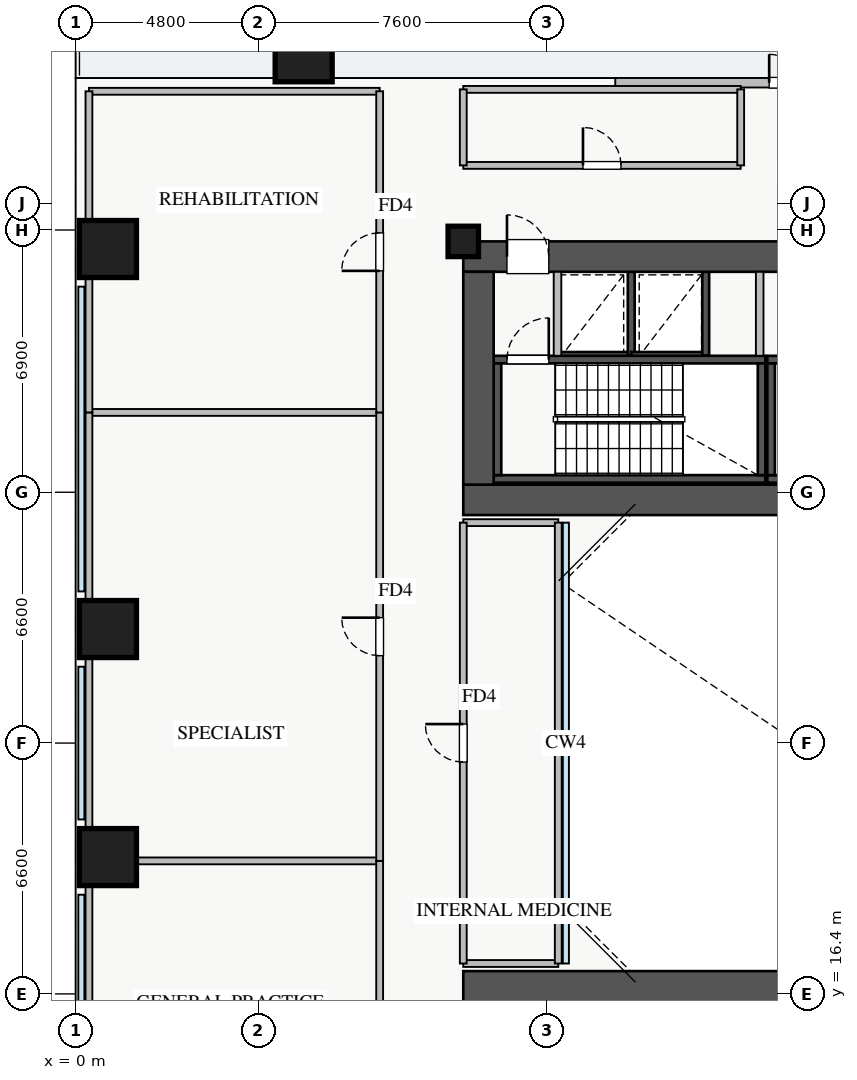
"""IFC4 building model, lengths in metres.
Left out: names, types, materials, properties, quantities, classifications, styles, units other than length and angle.
Written with IfcOpenShell. Run it as: python <this file> out.ifc"""

import sys

from ifc_helpers import new_model, si_unit, direction, frame, frame_2d, origin, origin_2d, place, context, subcontext, project, spatial, rectangle, extrude, source, transform, mapped, element, fill, save


model = new_model("IFC4")
c1 = context("Model", 3, precision=1e-05, world=origin(), true_north=direction((0.0, 1.0)))
c2 = subcontext(c1, "Body", "Model", "MODEL_VIEW")
j1 = project(units=[si_unit("LENGTHUNIT", "METRE"), si_unit("PLANEANGLEUNIT", "RADIAN")], contexts=[c1])
p1 = place(None, origin())
s1 = spatial("IfcSite", under=j1, at=p1, CompositionType="ELEMENT")
p2 = place(p1, origin())
s2 = spatial("IfcBuilding", under=s1, at=p2, CompositionType="ELEMENT")
p3 = place(p2, frame((0.0, 0.0, 13.8)))
s3 = spatial("IfcBuildingStorey", under=s2, at=p3, CompositionType="ELEMENT", Elevation=13.8)
p4 = place(p3, frame((12.68, 33.2, 0.0), z_axis=(0.0, 0.0, 1.0), x_axis=(1.0, 0.0, 0.0)))
e1 = element("IfcWall", 1, at=p4, inside=s3, PredefinedType="SHEAR", context=c2, shape_type="SweptSolid", body=[
    extrude(rectangle(XDim=1.94, YDim=0.18, at=frame_2d((0.97, 0.0))), origin(), (0.0, 0.0, 1.0), 4.15),
])
p5 = place(p3, frame((14.62, 33.2, 0.0), z_axis=(0.0, 0.0, 1.0), x_axis=(0.0, 1.0, 0.0)))
e2 = element("IfcWall", 2, at=p5, inside=s3, PredefinedType="SHEAR", context=c2, shape_type="SweptSolid", body=[
    extrude(rectangle(XDim=2.2, YDim=0.18, at=frame_2d((1.1, 0.0))), origin(), (0.0, 0.0, 1.0), 4.15),
])
p6 = place(p3, frame((14.62, 33.2, 0.0), z_axis=(0.0, 0.0, 1.0), x_axis=(1.0, 0.0, 0.0)))
e3 = element("IfcWall", 3, at=p6, inside=s3, PredefinedType="SHEAR", context=c2, shape_type="SweptSolid", body=[
    extrude(rectangle(XDim=1.96, YDim=0.18, at=frame_2d((0.98, 0.0))), origin(), (0.0, 0.0, 1.0), 4.15),
])
p7 = place(p3, frame((16.58, 33.2, 0.0), z_axis=(0.0, 0.0, 1.0), x_axis=(0.0, 1.0, 0.0)))
e4 = element("IfcWall", 4, at=p7, inside=s3, PredefinedType="SHEAR", context=c2, shape_type="SweptSolid", body=[
    extrude(rectangle(XDim=2.2, YDim=0.18, at=frame_2d((1.1, 0.0))), origin(), (0.0, 0.0, 1.0), 4.15),
])
p8 = place(p3, frame((11.0, 29.95, 0.0), z_axis=(0.0, 0.0, 1.0), x_axis=(1.0, 0.0, 0.0)))
e5 = element("IfcWall", 5, at=p8, inside=s3, PredefinedType="SHEAR", context=c2, shape_type="SweptSolid", body=[
    extrude(rectangle(XDim=7.15, YDim=0.2, at=frame_2d((3.575, 0.0))), origin(), (0.0, 0.0, 1.0), 4.4),
])
p9 = place(p3, frame((11.0, 33.09, 0.0), z_axis=(0.0, 0.0, 1.0), x_axis=(1.0, 0.0, 0.0)))
e6 = element("IfcWall", 6, at=p9, inside=s3, PredefinedType="SHEAR", context=c2, shape_type="SweptSolid", body=[
    extrude(rectangle(XDim=7.15, YDim=0.2, at=frame_2d((3.575, 0.0))), origin(), (0.0, 0.0, 1.0), 4.4),
])
p10 = place(p9, frame((0.35, 0.0, 0.0)))
e7 = element("IfcOpeningElement", 7, at=p10, cuts=e6, PredefinedType="OPENING", context=c2, shape_type="SweptSolid", body=[
    extrude(rectangle(XDim=1.1, YDim=2.05, at=frame_2d((0.55, 1.025))), frame((0.0, 0.11, 0.0), z_axis=(0.0, -1.0, 0.0), x_axis=(1.0, 0.0, 0.0)), (0.0, 0.0, 1.0), 0.22),
])
for number, where, z_axis, x_axis in (
    (8, (11.1, 30.05, 0.0), (0.0, 0.0, 1.0), (0.0, 1.0, 0.0)),
    (9, (18.05, 30.05, 0.0), (0.0, 0.0, 1.0), (0.0, 1.0, 0.0)),
):
    element("IfcWall", number, at=place(p3, frame(where, z_axis=z_axis, x_axis=x_axis)), inside=s3, PredefinedType="SHEAR", context=c2, shape_type="SweptSolid", body=[
        extrude(rectangle(XDim=2.94, YDim=0.2, at=frame_2d((1.47, 0.0))), origin(), (0.0, 0.0, 1.0), 4.4),
    ])
p11 = place(p3, frame((18.2, 29.95, 0.0), z_axis=(0.0, 0.0, 1.0), x_axis=(1.0, 0.0, 0.0)))
e10 = element("IfcWall", 10, at=p11, inside=s3, PredefinedType="SHEAR", context=c2, shape_type="SweptSolid", body=[
    extrude(rectangle(XDim=7.15, YDim=0.2, at=frame_2d((3.575, 0.0))), origin(), (0.0, 0.0, 1.0), 4.4),
])
p12 = place(p3, frame((18.2, 33.09, 0.0), z_axis=(0.0, 0.0, 1.0), x_axis=(1.0, 0.0, 0.0)))
e11 = element("IfcWall", 11, at=p12, inside=s3, PredefinedType="SHEAR", context=c2, shape_type="SweptSolid", body=[
    extrude(rectangle(XDim=7.15, YDim=0.2, at=frame_2d((3.575, 0.0))), origin(), (0.0, 0.0, 1.0), 4.4),
])
p13 = place(p12, frame((0.35, 0.0, 0.0)))
e12 = element("IfcOpeningElement", 12, at=p13, cuts=e11, PredefinedType="OPENING", context=c2, shape_type="SweptSolid", body=[
    extrude(rectangle(XDim=1.1, YDim=2.05, at=frame_2d((0.55, 1.025))), frame((0.0, 0.11, 0.0), z_axis=(0.0, -1.0, 0.0), x_axis=(1.0, 0.0, 0.0)), (0.0, 0.0, 1.0), 0.22),
])
p14 = place(p3, frame((18.3, 30.05, 0.0), z_axis=(0.0, 0.0, 1.0), x_axis=(0.0, 1.0, 0.0)))
e13 = element("IfcWall", 13, at=p14, inside=s3, PredefinedType="SHEAR", context=c2, shape_type="SweptSolid", body=[
    extrude(rectangle(XDim=2.94, YDim=0.2, at=frame_2d((1.47, 0.0))), origin(), (0.0, 0.0, 1.0), 4.4),
])
p15 = place(p3, frame((10.2, 29.4, 0.0), z_axis=(0.0, 0.0, 1.0), x_axis=(1.0, 0.0, 0.0)))
e14 = element("IfcWall", 14, at=p15, inside=s3, PredefinedType="SHEAR", context=c2, shape_type="SweptSolid", body=[
    extrude(rectangle(XDim=17.6, YDim=0.8, at=frame_2d((8.8, 0.0))), origin(), (0.0, 0.0, 1.0), 4.4),
])
p16 = place(p3, frame((10.2, 35.8, 0.0), z_axis=(0.0, 0.0, 1.0), x_axis=(1.0, 0.0, 0.0)))
e15 = element("IfcWall", 15, at=p16, inside=s3, PredefinedType="SHEAR", context=c2, shape_type="SweptSolid", body=[
    extrude(rectangle(XDim=17.6, YDim=0.8, at=frame_2d((8.8, 0.0))), origin(), (0.0, 0.0, 1.0), 4.4),
])
p17 = place(p16, frame((1.15, 0.0, 0.0)))
e16 = element("IfcOpeningElement", 16, at=p17, cuts=e15, PredefinedType="OPENING", context=c2, shape_type="SweptSolid", body=[
    extrude(rectangle(XDim=1.1, YDim=2.05, at=frame_2d((0.55, 1.025))), frame((0.0, 0.41, 0.0), z_axis=(0.0, -1.0, 0.0), x_axis=(1.0, 0.0, 0.0)), (0.0, 0.0, 1.0), 0.82),
])
p18 = place(p16, frame((8.3, 0.0, 0.0)))
e17 = element("IfcOpeningElement", 17, at=p18, cuts=e15, PredefinedType="OPENING", context=c2, shape_type="SweptSolid", body=[
    extrude(rectangle(XDim=1.1, YDim=2.05, at=frame_2d((0.55, 1.025))), frame((0.0, 0.41, 0.0), z_axis=(0.0, -1.0, 0.0), x_axis=(1.0, 0.0, 0.0)), (0.0, 0.0, 1.0), 0.82),
])
p19 = place(p16, frame((10.05, 0.0, 0.0)))
e18 = element("IfcOpeningElement", 18, at=p19, cuts=e15, PredefinedType="OPENING", context=c2, shape_type="SweptSolid", body=[
    extrude(rectangle(XDim=1.1, YDim=2.05, at=frame_2d((0.55, 1.025))), frame((0.0, 0.41, 0.0), z_axis=(0.0, -1.0, 0.0), x_axis=(1.0, 0.0, 0.0)), (0.0, 0.0, 1.0), 0.82),
])
p20 = place(p16, frame((14.74, 0.0, 0.0)))
e19 = element("IfcOpeningElement", 19, at=p20, cuts=e15, PredefinedType="OPENING", context=c2, shape_type="SweptSolid", body=[
    extrude(rectangle(XDim=1.0, YDim=2.05, at=frame_2d((0.5, 1.025))), frame((0.0, 0.41, 0.0), z_axis=(0.0, -1.0, 0.0), x_axis=(1.0, 0.0, 0.0)), (0.0, 0.0, 1.0), 0.82),
])
p21 = place(p16, frame((12.585, 0.0, 0.0)))
e20 = element("IfcOpeningElement", 20, at=p21, cuts=e15, PredefinedType="OPENING", context=c2, shape_type="SweptSolid", body=[
    extrude(rectangle(XDim=1.0, YDim=2.05, at=frame_2d((0.5, 1.025))), frame((0.0, 0.41, 0.0), z_axis=(0.0, -1.0, 0.0), x_axis=(1.0, 0.0, 0.0)), (0.0, 0.0, 1.0), 0.82),
])
p22 = place(p3, frame((10.6, 29.8, 0.0), z_axis=(0.0, 0.0, 1.0), x_axis=(0.0, 1.0, 0.0)))
e21 = element("IfcWall", 21, at=p22, inside=s3, PredefinedType="SHEAR", context=c2, shape_type="SweptSolid", body=[
    extrude(rectangle(XDim=5.6, YDim=0.8, at=frame_2d((2.8, 0.0))), origin(), (0.0, 0.0, 1.0), 4.4),
])
p23 = place(p3, frame((10.2, 16.6, 0.0), z_axis=(0.0, 0.0, 1.0), x_axis=(1.0, 0.0, 0.0)))
e22 = element("IfcWall", 22, at=p23, inside=s3, PredefinedType="SHEAR", context=c2, shape_type="SweptSolid", body=[
    extrude(rectangle(XDim=17.6, YDim=0.8, at=frame_2d((8.8, 0.0))), origin(), (0.0, 0.0, 1.0), 4.4),
])
m1 = source(origin(), c2, "Body", "SweptSolid", [
    extrude(rectangle(XDim=1.5, YDim=1.5, at=origin_2d()), origin(), (0.0, 0.0, 1.0), 4.4),
])
for number, where, z_axis, x_axis in (
    (23, (6.0, 41.15, 0.0), (0.0, 0.0, 1.0), (1.0, 0.0, 0.0)),
    (24, (0.85, 36.0, 0.0), (0.0, 0.0, 1.0), (1.0, 0.0, 0.0)),
    (25, (0.85, 26.0, 0.0), (0.0, 0.0, 1.0), (1.0, 0.0, 0.0)),
    (26, (0.85, 20.0, 0.0), (0.0, 0.0, 1.0), (1.0, 0.0, 0.0)),
):
    element("IfcColumn", number, at=place(p3, frame(where, z_axis=z_axis, x_axis=x_axis)), inside=s3, PredefinedType="COLUMN", context=c2, shape_type="MappedRepresentation", body=[
        mapped(m1, transform((0.0, 0.0, 0.0), x_axis=(1.0, 0.0, 0.0), y_axis=(0.0, 1.0, 0.0), z_axis=(0.0, 0.0, 1.0), scale=1.0)),
    ])
m2 = source(origin(), c2, "Body", "SweptSolid", [
    extrude(rectangle(XDim=0.8, YDim=0.8, at=origin_2d()), origin(), (0.0, 0.0, 1.0), 4.4),
])
p24 = place(p3, frame((10.2, 36.2, 0.0), z_axis=(0.0, 0.0, 1.0), x_axis=(1.0, 0.0, 0.0)))
e27 = element("IfcColumn", 27, at=p24, inside=s3, PredefinedType="PILASTER", context=c2, shape_type="MappedRepresentation", body=[
    mapped(m2, transform((0.0, 0.0, 0.0), x_axis=(1.0, 0.0, 0.0), y_axis=(0.0, 1.0, 0.0), z_axis=(0.0, 0.0, 1.0), scale=1.0)),
])
p25 = place(p3, frame((14.2, 40.375, 0.0), z_axis=(0.0, 0.0, 1.0), x_axis=(1.0, 0.0, 0.0)))
e28 = element("IfcWall", 28, at=p25, inside=s3, PredefinedType="STANDARD", context=c2, shape_type="SweptSolid", body=[
    extrude(rectangle(XDim=9.6, YDim=0.25, at=frame_2d((4.8, 0.0))), origin(), (0.0, 0.0, 1.0), 3.69),
])
p26 = place(p25, frame((4.05, 0.0, 0.0)))
e29 = element("IfcOpeningElement", 29, at=p26, cuts=e28, PredefinedType="OPENING", context=c2, shape_type="SweptSolid", body=[
    extrude(rectangle(XDim=1.5, YDim=2.15, at=frame_2d((0.75, 1.075))), frame((0.0, 0.135, 0.0), z_axis=(0.0, -1.0, 0.0), x_axis=(1.0, 0.0, 0.0)), (0.0, 0.0, 1.0), 0.27),
])
for number, where, z_axis, x_axis in (
    (30, (12.68, 33.19, 0.0), (0.0, 0.0, 1.0), (0.0, 1.0, 0.0)),
    (31, (18.0, 33.19, 0.0), (0.0, 0.0, 1.0), (0.0, 1.0, 0.0)),
):
    element("IfcWall", number, at=place(p3, frame(where, z_axis=z_axis, x_axis=x_axis)), inside=s3, PredefinedType="PARTITIONING", context=c2, shape_type="SweptSolid", body=[
        extrude(rectangle(XDim=2.21, YDim=0.2, at=frame_2d((1.105, 0.0))), origin(), (0.0, 0.0, 1.0), 4.15),
    ])
p27 = place(p3, frame((0.35, 19.9, 0.0), z_axis=(0.0, 0.0, 1.0), x_axis=(1.0, 0.0, 0.0)))
e32 = element("IfcWall", 32, at=p27, inside=s3, PredefinedType="PARTITIONING", context=c2, shape_type="SweptSolid", body=[
    extrude(rectangle(XDim=7.65, YDim=0.18, at=frame_2d((3.825, 0.0))), origin(), (0.0, 0.0, 1.0), 4.15),
])
p28 = place(p3, frame((0.35, 5.85, 0.0), z_axis=(0.0, 0.0, 1.0), x_axis=(0.0, 1.0, 0.0)))
e33 = element("IfcWall", 33, at=p28, inside=s3, PredefinedType="PARTITIONING", context=c2, shape_type="SweptSolid", body=[
    extrude(rectangle(XDim=14.05, YDim=0.18, at=frame_2d((7.025, 0.0))), origin(), (0.0, 0.0, 1.0), 4.15),
])
p29 = place(p3, frame((8.0, 5.85, 0.0), z_axis=(0.0, 0.0, 1.0), x_axis=(0.0, 1.0, 0.0)))
e34 = element("IfcWall", 34, at=p29, inside=s3, PredefinedType="PARTITIONING", context=c2, shape_type="SweptSolid", body=[
    extrude(rectangle(XDim=14.05, YDim=0.18, at=frame_2d((7.025, 0.0))), origin(), (0.0, 0.0, 1.0), 4.15),
])
p30 = place(p29, frame((6.525, 0.0, 0.0)))
e35 = element("IfcOpeningElement", 35, at=p30, cuts=e34, PredefinedType="OPENING", context=c2, shape_type="SweptSolid", body=[
    extrude(rectangle(XDim=1.0, YDim=2.05, at=frame_2d((0.5, 1.025))), frame((0.0, 0.1, 0.0), z_axis=(0.0, -1.0, 0.0), x_axis=(1.0, 0.0, 0.0)), (0.0, 0.0, 1.0), 0.2),
])
p31 = place(p3, frame((0.35, 31.7, 0.0), z_axis=(0.0, 0.0, 1.0), x_axis=(1.0, 0.0, 0.0)))
e36 = element("IfcWall", 36, at=p31, inside=s3, PredefinedType="PARTITIONING", context=c2, shape_type="SweptSolid", body=[
    extrude(rectangle(XDim=7.65, YDim=0.18, at=frame_2d((3.825, 0.0))), origin(), (0.0, 0.0, 1.0), 4.15),
])
p32 = place(p3, frame((0.35, 19.9, 0.0), z_axis=(0.0, 0.0, 1.0), x_axis=(0.0, 1.0, 0.0)))
e37 = element("IfcWall", 37, at=p32, inside=s3, PredefinedType="PARTITIONING", context=c2, shape_type="SweptSolid", body=[
    extrude(rectangle(XDim=11.8, YDim=0.18, at=frame_2d((5.9, 0.0))), origin(), (0.0, 0.0, 1.0), 4.15),
])
p33 = place(p3, frame((8.0, 19.9, 0.0), z_axis=(0.0, 0.0, 1.0), x_axis=(0.0, 1.0, 0.0)))
e38 = element("IfcWall", 38, at=p33, inside=s3, PredefinedType="PARTITIONING", context=c2, shape_type="SweptSolid", body=[
    extrude(rectangle(XDim=11.8, YDim=0.18, at=frame_2d((5.9, 0.0))), origin(), (0.0, 0.0, 1.0), 4.15),
])
p34 = place(p33, frame((5.4, 0.0, 0.0)))
e39 = element("IfcOpeningElement", 39, at=p34, cuts=e38, PredefinedType="OPENING", context=c2, shape_type="SweptSolid", body=[
    extrude(rectangle(XDim=1.0, YDim=2.05, at=frame_2d((0.5, 1.025))), frame((0.0, 0.1, 0.0), z_axis=(0.0, -1.0, 0.0), x_axis=(1.0, 0.0, 0.0)), (0.0, 0.0, 1.0), 0.2),
])
p35 = place(p3, frame((0.35, 40.15, 0.0), z_axis=(0.0, 0.0, 1.0), x_axis=(1.0, 0.0, 0.0)))
e40 = element("IfcWall", 40, at=p35, inside=s3, PredefinedType="PARTITIONING", context=c2, shape_type="SweptSolid", body=[
    extrude(rectangle(XDim=7.65, YDim=0.18, at=frame_2d((3.825, 0.0))), origin(), (0.0, 0.0, 1.0), 4.15),
])
p36 = place(p3, frame((0.35, 31.7, 0.0), z_axis=(0.0, 0.0, 1.0), x_axis=(0.0, 1.0, 0.0)))
e41 = element("IfcWall", 41, at=p36, inside=s3, PredefinedType="PARTITIONING", context=c2, shape_type="SweptSolid", body=[
    extrude(rectangle(XDim=8.45, YDim=0.18, at=frame_2d((4.225, 0.0))), origin(), (0.0, 0.0, 1.0), 4.15),
])
p37 = place(p3, frame((8.0, 31.7, 0.0), z_axis=(0.0, 0.0, 1.0), x_axis=(0.0, 1.0, 0.0)))
e42 = element("IfcWall", 42, at=p37, inside=s3, PredefinedType="PARTITIONING", context=c2, shape_type="SweptSolid", body=[
    extrude(rectangle(XDim=8.45, YDim=0.18, at=frame_2d((4.225, 0.0))), origin(), (0.0, 0.0, 1.0), 4.15),
])
p38 = place(p37, frame((3.725, 0.0, 0.0)))
e43 = element("IfcOpeningElement", 43, at=p38, cuts=e42, PredefinedType="OPENING", context=c2, shape_type="SweptSolid", body=[
    extrude(rectangle(XDim=1.0, YDim=2.05, at=frame_2d((0.5, 1.025))), frame((0.0, 0.1, 0.0), z_axis=(0.0, -1.0, 0.0), x_axis=(1.0, 0.0, 0.0)), (0.0, 0.0, 1.0), 0.2),
])
for number, where, z_axis, x_axis in (
    (44, (10.2, 17.2, 0.0), (0.0, 0.0, 1.0), (1.0, 0.0, 0.0)),
    (45, (10.2, 28.8, 0.0), (0.0, 0.0, 1.0), (1.0, 0.0, 0.0)),
):
    element("IfcWall", number, at=place(p3, frame(where, z_axis=z_axis, x_axis=x_axis)), inside=s3, PredefinedType="PARTITIONING", context=c2, shape_type="SweptSolid", body=[
        extrude(rectangle(XDim=2.5, YDim=0.18, at=frame_2d((1.25, 0.0))), origin(), (0.0, 0.0, 1.0), 4.15),
    ])
p39 = place(p3, frame((10.2, 17.2, 0.0), z_axis=(0.0, 0.0, 1.0), x_axis=(0.0, 1.0, 0.0)))
e46 = element("IfcWall", 46, at=p39, inside=s3, PredefinedType="PARTITIONING", context=c2, shape_type="SweptSolid", body=[
    extrude(rectangle(XDim=11.6, YDim=0.18, at=frame_2d((5.8, 0.0))), origin(), (0.0, 0.0, 1.0), 4.15),
])
p40 = place(p39, frame((5.3, 0.0, 0.0)))
e47 = element("IfcOpeningElement", 47, at=p40, cuts=e46, PredefinedType="OPENING", context=c2, shape_type="SweptSolid", body=[
    extrude(rectangle(XDim=1.0, YDim=2.05, at=frame_2d((0.5, 1.025))), frame((0.0, 0.1, 0.0), z_axis=(0.0, -1.0, 0.0), x_axis=(1.0, 0.0, 0.0)), (0.0, 0.0, 1.0), 0.2),
])
p41 = place(p3, frame((12.7, 17.2, 0.0), z_axis=(0.0, 0.0, 1.0), x_axis=(0.0, 1.0, 0.0)))
e48 = element("IfcWall", 48, at=p41, inside=s3, PredefinedType="PARTITIONING", context=c2, shape_type="SweptSolid", body=[
    extrude(rectangle(XDim=11.6, YDim=0.18, at=frame_2d((5.8, 0.0))), origin(), (0.0, 0.0, 1.0), 4.15),
])
p42 = place(p3, frame((10.2, 38.2, 0.0), z_axis=(0.0, 0.0, 1.0), x_axis=(1.0, 0.0, 0.0)))
e49 = element("IfcWall", 49, at=p42, inside=s3, PredefinedType="PARTITIONING", context=c2, shape_type="SweptSolid", body=[
    extrude(rectangle(XDim=7.3, YDim=0.18, at=frame_2d((3.65, 0.0))), origin(), (0.0, 0.0, 1.0), 4.15),
])
p43 = place(p42, frame((3.15, 0.0, 0.0)))
e50 = element("IfcOpeningElement", 50, at=p43, cuts=e49, PredefinedType="OPENING", context=c2, shape_type="SweptSolid", body=[
    extrude(rectangle(XDim=1.0, YDim=2.05, at=frame_2d((0.5, 1.025))), frame((0.0, 0.1, 0.0), z_axis=(0.0, -1.0, 0.0), x_axis=(1.0, 0.0, 0.0)), (0.0, 0.0, 1.0), 0.2),
])
p44 = place(p3, frame((10.2, 40.2, 0.0), z_axis=(0.0, 0.0, 1.0), x_axis=(1.0, 0.0, 0.0)))
e51 = element("IfcWall", 51, at=p44, inside=s3, PredefinedType="PARTITIONING", context=c2, shape_type="SweptSolid", body=[
    extrude(rectangle(XDim=7.3, YDim=0.18, at=frame_2d((3.65, 0.0))), origin(), (0.0, 0.0, 1.0), 4.15),
])
for number, where, z_axis, x_axis in (
    (52, (10.2, 38.2, 0.0), (0.0, 0.0, 1.0), (0.0, 1.0, 0.0)),
    (53, (17.5, 38.2, 0.0), (0.0, 0.0, 1.0), (0.0, 1.0, 0.0)),
):
    element("IfcWall", number, at=place(p3, frame(where, z_axis=z_axis, x_axis=x_axis)), inside=s3, PredefinedType="PARTITIONING", context=c2, shape_type="SweptSolid", body=[
        extrude(rectangle(XDim=2.0, YDim=0.18, at=frame_2d((1.0, 0.0))), origin(), (0.0, 0.0, 1.0), 4.15),
    ])
m3 = source(origin(), c2, "Body", "SweptSolid", [
    extrude(rectangle(XDim=1.5, YDim=2.15, at=frame_2d((0.75, 1.075))), frame((0.0, 0.025, 0.0), z_axis=(0.0, -1.0, 0.0), x_axis=(1.0, 0.0, 0.0)), (0.0, 0.0, 1.0), 0.05),
])
p45 = place(p26, origin())
e54 = element("IfcDoor", 54, at=p45, inside=s3, OperationType="DOUBLE_DOOR_SINGLE_SWING", PredefinedType="DOOR", context=c2, shape_type="MappedRepresentation", body=[
    mapped(m3, transform((0.0, 0.0, 0.0), x_axis=(1.0, 0.0, 0.0), y_axis=(0.0, 1.0, 0.0), z_axis=(0.0, 0.0, 1.0), scale=1.0)),
])
fill(e29, e54)
m4 = source(origin(), c2, "Body", "SweptSolid", [
    extrude(rectangle(XDim=1.1, YDim=2.05, at=frame_2d((0.55, 1.025))), frame((0.0, 0.025, 0.0), z_axis=(0.0, -1.0, 0.0), x_axis=(1.0, 0.0, 0.0)), (0.0, 0.0, 1.0), 0.05),
])
p46 = place(p17, origin())
e55 = element("IfcDoor", 55, at=p46, inside=s3, OperationType="SINGLE_SWING_LEFT", PredefinedType="DOOR", context=c2, shape_type="MappedRepresentation", body=[
    mapped(m4, transform((0.0, 0.0, 0.0), x_axis=(1.0, 0.0, 0.0), y_axis=(0.0, 1.0, 0.0), z_axis=(0.0, 0.0, 1.0), scale=1.0)),
])
fill(e16, e55)
p47 = place(p10, origin())
e56 = element("IfcDoor", 56, at=p47, inside=s3, OperationType="SINGLE_SWING_RIGHT", PredefinedType="DOOR", context=c2, shape_type="MappedRepresentation", body=[
    mapped(m4, transform((0.0, 0.0, 0.0), x_axis=(1.0, 0.0, 0.0), y_axis=(0.0, 1.0, 0.0), z_axis=(0.0, 0.0, 1.0), scale=1.0)),
])
fill(e7, e56)
m5 = source(origin(), c2, "Body", "SweptSolid", [
    extrude(rectangle(XDim=1.0, YDim=2.05, at=frame_2d((0.5, 1.025))), frame((0.0, 0.025, 0.0), z_axis=(0.0, -1.0, 0.0), x_axis=(1.0, 0.0, 0.0)), (0.0, 0.0, 1.0), 0.05),
])
p48 = place(p34, origin())
e57 = element("IfcDoor", 57, at=p48, inside=s3, OperationType="SINGLE_SWING_RIGHT", PredefinedType="DOOR", context=c2, shape_type="MappedRepresentation", body=[
    mapped(m5, transform((0.0, 0.0, 0.0), x_axis=(1.0, 0.0, 0.0), y_axis=(0.0, 1.0, 0.0), z_axis=(0.0, 0.0, 1.0), scale=1.0)),
])
fill(e39, e57)
p49 = place(p38, origin())
e58 = element("IfcDoor", 58, at=p49, inside=s3, OperationType="SINGLE_SWING_LEFT", PredefinedType="DOOR", context=c2, shape_type="MappedRepresentation", body=[
    mapped(m5, transform((0.0, 0.0, 0.0), x_axis=(1.0, 0.0, 0.0), y_axis=(0.0, 1.0, 0.0), z_axis=(0.0, 0.0, 1.0), scale=1.0)),
])
fill(e43, e58)
p50 = place(p40, origin())
e59 = element("IfcDoor", 59, at=p50, inside=s3, OperationType="SINGLE_SWING_RIGHT", PredefinedType="DOOR", context=c2, shape_type="MappedRepresentation", body=[
    mapped(m5, transform((0.0, 0.0, 0.0), x_axis=(1.0, 0.0, 0.0), y_axis=(0.0, 1.0, 0.0), z_axis=(0.0, 0.0, 1.0), scale=1.0)),
])
fill(e47, e59)
p51 = place(p43, origin())
e60 = element("IfcDoor", 60, at=p51, inside=s3, OperationType="SINGLE_SWING_LEFT", PredefinedType="DOOR", context=c2, shape_type="MappedRepresentation", body=[
    mapped(m5, transform((0.0, 0.0, 0.0), x_axis=(1.0, 0.0, 0.0), y_axis=(0.0, 1.0, 0.0), z_axis=(0.0, 0.0, 1.0), scale=1.0)),
])
fill(e50, e60)
save(model, sys.argv[1])
